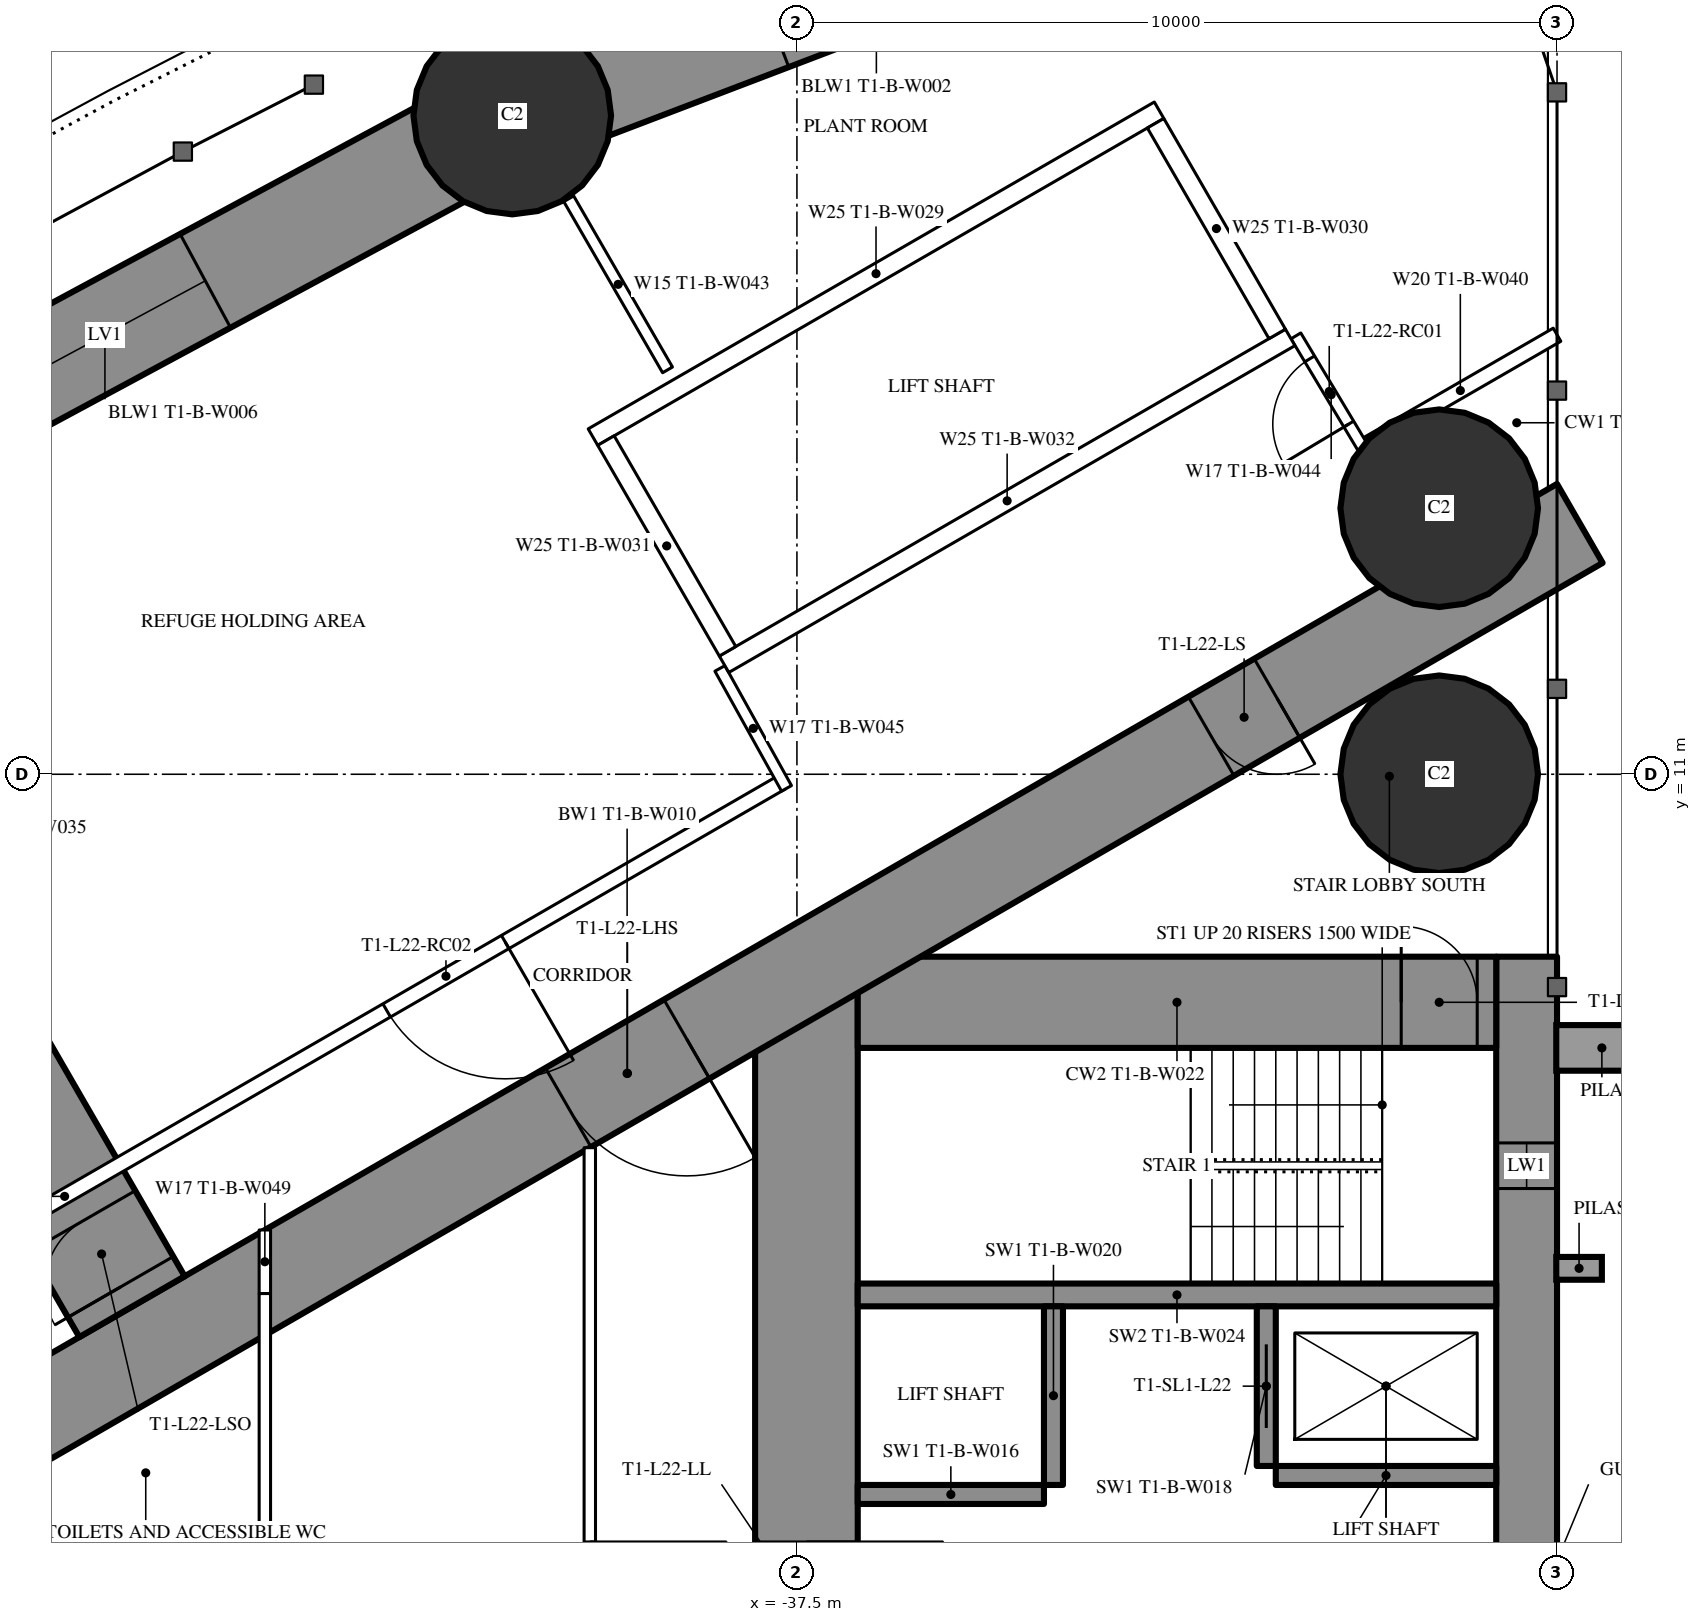
"""IFC4 building model, lengths in metres.
Left out: names, types, materials, properties, quantities, classifications, styles, units other than length and angle.
Written with IfcOpenShell. Run it as: python <this file> out.ifc"""

import sys

from ifc_helpers import new_model, si_unit, direction, frame, frame_2d, origin, origin_2d, place, context, subcontext, project, spatial, rectangle, hollow_circle, extrude, element, fill, save


model = new_model("IFC4")
c1 = context("Model", 3, precision=1e-05, world=origin(), true_north=direction((0.0, 1.0)))
c2 = subcontext(c1, "Body", "Model", "MODEL_VIEW")
j1 = project(units=[si_unit("LENGTHUNIT", "METRE"), si_unit("PLANEANGLEUNIT", "RADIAN")], contexts=[c1])
p1 = place(None, origin())
s1 = spatial("IfcSite", under=j1, at=p1, CompositionType="ELEMENT")
p2 = place(p1, origin())
s2 = spatial("IfcBuilding", under=s1, at=p2, CompositionType="ELEMENT")
p3 = place(p2, frame((0.0, 0.0, 87.0)))
s3 = spatial("IfcBuildingStorey", under=s2, at=p3, CompositionType="ELEMENT", Elevation=87.0)
for number, where, z_axis, x_axis in (
    (1, (-29.05, 11.0, 0.0), (0.0, 0.0, 1.0), (1.0, 0.0, 0.0)),
    (2, (-29.05, 14.5, 0.0), (0.0, 0.0, 1.0), (1.0, 0.0, 0.0)),
    (3, (-41.245, 19.666, 0.0), (0.0, 0.0, 1.0), (1.0, 0.0, 0.0)),
):
    element("IfcColumn", number, at=place(p3, frame(where, z_axis=z_axis, x_axis=x_axis)), inside=s3, PredefinedType="COLUMN", context=c2, shape_type="SweptSolid", body=[
        extrude(hollow_circle(Radius=1.3, WallThickness=0.1, at=origin_2d()), origin(), (0.0, 0.0, 1.0), 3.6),
    ])
p4 = place(p3, frame((-27.9, 8.6, 0.0), z_axis=(0.0, 0.0, 1.0), x_axis=(0.0, -1.0, 0.0)))
e4 = element("IfcWall", 4, at=p4, inside=s3, PredefinedType="SHEAR", context=c2, shape_type="SweptSolid", body=[
    extrude(rectangle(XDim=17.2, YDim=0.8, at=frame_2d((8.6, 0.0))), origin(), (0.0, 0.0, 1.0), 3.6),
])
p5 = place(p4, frame((2.45, 0.0, 0.6)))
e5 = element("IfcOpeningElement", 5, at=p5, cuts=e4, PredefinedType="OPENING", context=c2, shape_type="SweptSolid", body=[
    extrude(rectangle(XDim=0.6, YDim=2.1, at=frame_2d((0.3, 1.05))), frame((0.0, 0.41, 0.0), z_axis=(0.0, -1.0, 0.0), x_axis=(1.0, 0.0, 0.0)), (0.0, 0.0, 1.0), 0.82),
])
p6 = place(p4, frame((14.15, 0.0, 0.6)))
e6 = element("IfcOpeningElement", 6, at=p6, cuts=e4, PredefinedType="OPENING", context=c2, shape_type="SweptSolid", body=[
    extrude(rectangle(XDim=0.6, YDim=2.1, at=frame_2d((0.3, 1.05))), frame((0.0, 0.41, 0.0), z_axis=(0.0, -1.0, 0.0), x_axis=(1.0, 0.0, 0.0)), (0.0, 0.0, 1.0), 0.82),
])
p7 = place(p3, frame((-37.375, 8.6, 0.0), z_axis=(0.0, 0.0, 1.0), x_axis=(0.0, -1.0, 0.0)))
e7 = element("IfcWall", 7, at=p7, inside=s3, PredefinedType="SHEAR", context=c2, shape_type="SweptSolid", body=[
    extrude(rectangle(XDim=17.2, YDim=1.35, at=frame_2d((8.6, 0.0))), origin(), (0.0, 0.0, 1.0), 3.6),
])
p8 = place(p7, frame((7.7, 0.0, 0.0)))
e8 = element("IfcOpeningElement", 8, at=p8, cuts=e7, PredefinedType="OPENING", context=c2, shape_type="SweptSolid", body=[
    extrude(rectangle(XDim=1.8, YDim=2.2, at=frame_2d((0.9, 1.1))), frame((0.0, 0.685, 0.0), z_axis=(0.0, -1.0, 0.0), x_axis=(1.0, 0.0, 0.0)), (0.0, 0.0, 1.0), 1.37),
])
p9 = place(p3, frame((-28.3, 8.0, 0.0), z_axis=(0.0, 0.0, 1.0), x_axis=(-1.0, 0.0, 0.0)))
e9 = element("IfcWall", 9, at=p9, inside=s3, PredefinedType="SHEAR", context=c2, shape_type="SweptSolid", body=[
    extrude(rectangle(XDim=8.4, YDim=1.2, at=frame_2d((4.2, 0.0))), origin(), (0.0, 0.0, 1.0), 3.6),
])
p10 = place(p9, frame((0.25, 0.0, 0.0)))
e10 = element("IfcOpeningElement", 10, at=p10, cuts=e9, PredefinedType="OPENING", context=c2, shape_type="SweptSolid", body=[
    extrude(rectangle(XDim=1.0, YDim=2.2, at=frame_2d((0.5, 1.1))), frame((0.0, 0.61, 0.0), z_axis=(0.0, -1.0, 0.0), x_axis=(1.0, 0.0, 0.0)), (0.0, 0.0, 1.0), 1.22),
])
p11 = place(p3, frame((-28.3, 4.15, 0.0), z_axis=(0.0, 0.0, 1.0), x_axis=(-1.0, 0.0, 0.0)))
e11 = element("IfcWall", 11, at=p11, inside=s3, PredefinedType="SHEAR", context=c2, shape_type="SweptSolid", body=[
    extrude(rectangle(XDim=8.4, YDim=0.3, at=frame_2d((4.2, 0.0))), origin(), (0.0, 0.0, 1.0), 3.6),
])
p12 = place(p3, frame((-31.325, 4.0, 0.0), z_axis=(0.0, 0.0, 1.0), x_axis=(0.0, -1.0, 0.0)))
e12 = element("IfcWall", 12, at=p12, inside=s3, PredefinedType="SHEAR", context=c2, shape_type="SweptSolid", body=[
    extrude(rectangle(XDim=2.1, YDim=0.25, at=frame_2d((1.05, 0.0))), origin(), (0.0, 0.0, 1.0), 3.6),
])
p13 = place(p12, frame((0.5, 0.0, 0.0)))
e13 = element("IfcOpeningElement", 13, at=p13, cuts=e12, PredefinedType="OPENING", context=c2, shape_type="SweptSolid", body=[
    extrude(rectangle(XDim=1.1, YDim=2.2, at=frame_2d((0.55, 1.1))), frame((0.0, 0.135, 0.0), z_axis=(0.0, -1.0, 0.0), x_axis=(1.0, 0.0, 0.0)), (0.0, 0.0, 1.0), 0.27),
])
p14 = place(p3, frame((-34.125, 4.0, 0.0), z_axis=(0.0, 0.0, 1.0), x_axis=(0.0, -1.0, 0.0)))
e14 = element("IfcWall", 14, at=p14, inside=s3, PredefinedType="SHEAR", context=c2, shape_type="SweptSolid", body=[
    extrude(rectangle(XDim=2.35, YDim=0.25, at=frame_2d((1.175, 0.0))), origin(), (0.0, 0.0, 1.0), 3.6),
])
p15 = place(p3, frame((-28.3, 1.775, 0.0), z_axis=(0.0, 0.0, 1.0), x_axis=(-1.0, 0.0, 0.0)))
e15 = element("IfcWall", 15, at=p15, inside=s3, PredefinedType="SHEAR", context=c2, shape_type="SweptSolid", body=[
    extrude(rectangle(XDim=2.9, YDim=0.25, at=frame_2d((1.45, 0.0))), origin(), (0.0, 0.0, 1.0), 3.6),
])
p16 = place(p3, frame((-34.25, 1.525, 0.0), z_axis=(0.0, 0.0, 1.0), x_axis=(-1.0, 0.0, 0.0)))
e16 = element("IfcWall", 16, at=p16, inside=s3, PredefinedType="SHEAR", context=c2, shape_type="SweptSolid", body=[
    extrude(rectangle(XDim=2.45, YDim=0.25, at=frame_2d((1.225, 0.0))), origin(), (0.0, 0.0, 1.0), 3.6),
])
p17 = place(p3, frame((-27.2, 14.3, 0.0), z_axis=(0.0, 0.0, 1.0), x_axis=(-0.866026593062, -0.499997940104, 0.0)))
e17 = element("IfcWall", 17, at=p17, inside=s3, PredefinedType="SHEAR", context=c2, shape_type="SweptSolid", body=[
    extrude(rectangle(XDim=28.946, YDim=1.2, at=frame_2d((14.473, 0.0))), origin(), (0.0, 0.0, 1.0), 3.6),
])
p18 = place(p17, frame((4.6, 0.0, 0.0)))
e18 = element("IfcOpeningElement", 18, at=p18, cuts=e17, PredefinedType="OPENING", context=c2, shape_type="SweptSolid", body=[
    extrude(rectangle(XDim=1.0, YDim=2.2, at=frame_2d((0.5, 1.1))), frame((0.0, 0.61, 0.0), z_axis=(0.0, -1.0, 0.0), x_axis=(1.0, 0.0, 0.0)), (0.0, 0.0, 1.0), 1.22),
])
p19 = place(p17, frame((13.568, 0.0, 0.0)))
e19 = element("IfcOpeningElement", 19, at=p19, cuts=e17, PredefinedType="OPENING", context=c2, shape_type="SweptSolid", body=[
    extrude(rectangle(XDim=1.8, YDim=2.03, at=frame_2d((0.9, 1.015))), frame((0.0, 0.61, 0.0), z_axis=(0.0, -1.0, 0.0), x_axis=(1.0, 0.0, 0.0)), (0.0, 0.0, 1.0), 1.22),
])
p20 = place(p3, frame((-46.248, 3.996, 0.0), z_axis=(0.0, 0.0, 1.0), x_axis=(-0.499993613132, 0.866029091213, 0.0)))
e20 = element("IfcWall", 20, at=p20, inside=s3, PredefinedType="SHEAR", context=c2, shape_type="SweptSolid", body=[
    extrude(rectangle(XDim=11.431, YDim=1.6, at=frame_2d((5.715, 0.0))), origin(), (0.0, 0.0, 1.0), 3.6),
])
p21 = place(p20, frame((0.3, 0.0, 0.0)))
e21 = element("IfcOpeningElement", 21, at=p21, cuts=e20, PredefinedType="OPENING", context=c2, shape_type="SweptSolid", body=[
    extrude(rectangle(XDim=1.0, YDim=2.2, at=frame_2d((0.5, 1.1))), frame((0.0, 0.81, 0.0), z_axis=(0.0, -1.0, 0.0), x_axis=(1.0, 0.0, 0.0)), (0.0, 0.0, 1.0), 1.62),
])
p22 = place(p3, frame((-31.665, 23.318, 0.0), z_axis=(0.0, 0.0, 1.0), x_axis=(-0.934392266213, -0.356245832033, 0.0)))
e22 = element("IfcWall", 22, at=p22, inside=s3, PredefinedType="SHEAR", context=c2, shape_type="SweptSolid", body=[
    extrude(rectangle(XDim=10.253, YDim=1.4, at=frame_2d((5.126, 0.0))), origin(), (0.0, 0.0, 1.0), 3.6),
])
p23 = place(p22, frame((3.626, 0.0, 0.6)))
e23 = element("IfcOpeningElement", 23, at=p23, cuts=e22, PredefinedType="OPENING", context=c2, shape_type="SweptSolid", body=[
    extrude(rectangle(XDim=3.0, YDim=1.2, at=frame_2d((1.5, 0.6))), frame((0.0, 0.71, 0.0), z_axis=(0.0, -1.0, 0.0), x_axis=(1.0, 0.0, 0.0)), (0.0, 0.0, 1.0), 1.42),
])
p24 = place(p3, frame((-41.245, 19.666, 0.0), z_axis=(0.0, 0.0, 1.0), x_axis=(-0.880492350889, -0.474060354835, 0.0)))
e24 = element("IfcWall", 24, at=p24, inside=s3, PredefinedType="SHEAR", context=c2, shape_type="SweptSolid", body=[
    extrude(rectangle(XDim=12.173, YDim=1.4, at=frame_2d((6.086, 0.0))), origin(), (0.0, 0.0, 1.0), 3.6),
])
p25 = place(p24, frame((4.586, 0.0, 0.6)))
e25 = element("IfcOpeningElement", 25, at=p25, cuts=e24, PredefinedType="OPENING", context=c2, shape_type="SweptSolid", body=[
    extrude(rectangle(XDim=3.0, YDim=1.2, at=frame_2d((1.5, 0.6))), frame((0.0, 0.71, 0.0), z_axis=(0.0, -1.0, 0.0), x_axis=(1.0, 0.0, 0.0)), (0.0, 0.0, 1.0), 1.42),
])
p26 = place(p3, frame((-39.202, 16.32, 0.0), z_axis=(0.0, 0.0, 1.0), x_axis=(-0.499947391036, 0.866055775454, 0.0)))
e26 = element("IfcWall", 26, at=p26, inside=s3, PredefinedType="PARTITIONING", context=c2, shape_type="SweptSolid", body=[
    extrude(rectangle(XDim=2.599, YDim=0.15, at=frame_2d((1.3, 0.0))), origin(), (0.0, 0.0, 1.0), 3.35),
])
p27 = place(p3, frame((-27.5, 16.782, 0.0), z_axis=(0.0, 0.0, 1.0), x_axis=(-0.866045812642, -0.499964649156, 0.0)))
e27 = element("IfcWall", 27, at=p27, inside=s3, PredefinedType="PARTITIONING", context=c2, shape_type="SweptSolid", body=[
    extrude(rectangle(XDim=2.938, YDim=0.2, at=frame_2d((1.469, 0.0))), origin(), (0.0, 0.0, 1.0), 3.35),
])
p28 = place(p3, frame((-37.7, 10.894, 0.0), z_axis=(0.0, 0.0, 1.0), x_axis=(-0.866027905338, -0.499995667157, 0.0)))
e28 = element("IfcWall", 28, at=p28, inside=s3, PredefinedType="PARTITIONING", context=c2, shape_type="SweptSolid", body=[
    extrude(rectangle(XDim=21.787, YDim=0.2, at=frame_2d((10.894, 0.0))), origin(), (0.0, 0.0, 1.0), 3.35),
])
p29 = place(p28, frame((15.094, 0.0, 0.0)))
e29 = element("IfcOpeningElement", 29, at=p29, cuts=e28, PredefinedType="OPENING", context=c2, shape_type="SweptSolid", body=[
    extrude(rectangle(XDim=1.8, YDim=2.2, at=frame_2d((0.9, 1.1))), frame((0.0, 0.11, 0.0), z_axis=(0.0, -1.0, 0.0), x_axis=(1.0, 0.0, 0.0)), (0.0, 0.0, 1.0), 0.22),
])
p30 = place(p28, frame((4.201, 0.0, 0.0)))
e30 = element("IfcOpeningElement", 30, at=p30, cuts=e28, PredefinedType="OPENING", context=c2, shape_type="SweptSolid", body=[
    extrude(rectangle(XDim=1.8, YDim=2.2, at=frame_2d((0.9, 1.1))), frame((0.0, 0.11, 0.0), z_axis=(0.0, -1.0, 0.0), x_axis=(1.0, 0.0, 0.0)), (0.0, 0.0, 1.0), 0.22),
])
p31 = place(p3, frame((-30.007, 15.219, 0.0), z_axis=(0.0, 0.0, 1.0), x_axis=(-0.514296815006, 0.857612258585, 0.0)))
e31 = element("IfcWall", 31, at=p31, inside=s3, PredefinedType="PARTITIONING", context=c2, shape_type="SweptSolid", body=[
    extrude(rectangle(XDim=1.805, YDim=0.15, at=frame_2d((0.902, 0.0))), origin(), (0.0, 0.0, 1.0), 2.3),
])
p32 = place(p31, frame((0.452, 0.0, 0.0)))
e32 = element("IfcOpeningElement", 32, at=p32, cuts=e31, PredefinedType="OPENING", context=c2, shape_type="SweptSolid", body=[
    extrude(rectangle(XDim=1.0, YDim=2.03, at=frame_2d((0.5, 1.015))), frame((0.0, 0.085, 0.0), z_axis=(0.0, -1.0, 0.0), x_axis=(1.0, 0.0, 0.0)), (0.0, 0.0, 1.0), 0.17),
])
p33 = place(p3, frame((-38.513, 12.392, 0.0), z_axis=(0.0, 0.0, 1.0), x_axis=(0.485585508183, -0.874189175317, 0.0)))
e33 = element("IfcWall", 33, at=p33, inside=s3, PredefinedType="PARTITIONING", context=c2, shape_type="SweptSolid", body=[
    extrude(rectangle(XDim=1.805, YDim=0.15, at=frame_2d((0.902, 0.0))), origin(), (0.0, 0.0, 1.0), 3.35),
])
p34 = place(p3, frame((-40.225, 6.087, 0.0), z_axis=(0.0, 0.0, 1.0), x_axis=(0.0, -1.0, 0.0)))
e34 = element("IfcWall", 34, at=p34, inside=s3, PredefinedType="PARTITIONING", context=c2, shape_type="SweptSolid", body=[
    extrude(rectangle(XDim=12.174, YDim=0.15, at=frame_2d((6.087, 0.0))), origin(), (0.0, 0.0, 1.0), 3.35),
])
p35 = place(p34, frame((5.187, 0.0, 0.0)))
e35 = element("IfcOpeningElement", 35, at=p35, cuts=e34, PredefinedType="OPENING", context=c2, shape_type="SweptSolid", body=[
    extrude(rectangle(XDim=1.8, YDim=2.2, at=frame_2d((0.9, 1.1))), frame((0.0, 0.085, 0.0), z_axis=(0.0, -1.0, 0.0), x_axis=(1.0, 0.0, 0.0)), (0.0, 0.0, 1.0), 0.17),
])
p36 = place(p3, frame((-44.5, 4.169, 0.0), z_axis=(0.0, 0.0, 1.0), x_axis=(0.0, -1.0, 0.0)))
e36 = element("IfcWall", 36, at=p36, inside=s3, PredefinedType="PARTITIONING", context=c2, shape_type="SweptSolid", body=[
    extrude(rectangle(XDim=9.173, YDim=0.15, at=frame_2d((4.587, 0.0))), origin(), (0.0, 0.0, 1.0), 3.35),
])
p37 = place(p36, frame((3.669, 0.0, 0.0)))
e37 = element("IfcOpeningElement", 37, at=p37, cuts=e36, PredefinedType="OPENING", context=c2, shape_type="SweptSolid", body=[
    extrude(rectangle(XDim=1.0, YDim=2.2, at=frame_2d((0.5, 1.1))), frame((0.0, 0.085, 0.0), z_axis=(0.0, -1.0, 0.0), x_axis=(1.0, 0.0, 0.0)), (0.0, 0.0, 1.0), 0.17),
])
for number, where, z_axis, x_axis in (
    (38, (-31.01, 16.747, 0.0), (0.0, 0.0, 1.0), (-0.866, -0.5, 0.0)),
    (39, (-32.736, 19.736, 0.0), (0.0, 0.0, 1.0), (-0.866, -0.5, 0.0)),
):
    element("IfcWall", number, at=place(p3, frame(where, z_axis=z_axis, x_axis=x_axis)), inside=s3, PredefinedType="PARTITIONING", context=c2, shape_type="SweptSolid", body=[
        extrude(rectangle(XDim=8.6, YDim=0.25, at=frame_2d((4.3, 0.0))), origin(), (0.0, 0.0, 1.0), 3.35),
    ])
p38 = place(p3, frame((-31.181, 16.793, 0.0), z_axis=(0.0, 0.0, 1.0), x_axis=(-0.499929347863, 0.866066190972, 0.0)))
e40 = element("IfcWall", 40, at=p38, inside=s3, PredefinedType="PARTITIONING", context=c2, shape_type="SweptSolid", body=[
    extrude(rectangle(XDim=3.201, YDim=0.25, at=frame_2d((1.6, 0.0))), origin(), (0.0, 0.0, 1.0), 3.35),
])
p39 = place(p3, frame((-38.413, 12.618, 0.0), z_axis=(0.0, 0.0, 1.0), x_axis=(-0.499872130319, 0.866099216793, 0.0)))
e41 = element("IfcWall", 41, at=p39, inside=s3, PredefinedType="PARTITIONING", context=c2, shape_type="SweptSolid", body=[
    extrude(rectangle(XDim=3.2, YDim=0.25, at=frame_2d((1.6, 0.0))), origin(), (0.0, 0.0, 1.0), 3.35),
])
p40 = place(p3, frame((-44.5, 5.005, 0.0), z_axis=(0.0, 0.0, 1.0), x_axis=(0.0, -1.0, 0.0)))
e42 = element("IfcWall", 42, at=p40, inside=s3, PredefinedType="PARTITIONING", context=c2, shape_type="SweptSolid", body=[
    extrude(rectangle(XDim=0.836, YDim=0.15, at=frame_2d((0.418, 0.0))), origin(), (0.0, 0.0, 1.0), 2.05),
])
p41 = place(p25, origin())
e43 = element("IfcWindow", 43, at=p41, inside=s3, PartitioningType="SINGLE_PANEL", PredefinedType="WINDOW", context=c2, shape_type="SweptSolid", body=[
    extrude(rectangle(XDim=3.0, YDim=1.2, at=frame_2d((1.5, 0.6))), frame((0.0, 0.03, 0.0), z_axis=(0.0, -1.0, 0.0), x_axis=(1.0, 0.0, 0.0)), (0.0, 0.0, 1.0), 0.06),
])
fill(e25, e43)
p42 = place(p21, origin())
e44 = element("IfcDoor", 44, at=p42, inside=s3, OperationType="SINGLE_SWING_LEFT", PredefinedType="DOOR", context=c2, shape_type="SweptSolid", body=[
    extrude(rectangle(XDim=1.0, YDim=2.2, at=frame_2d((0.5, 1.1))), frame((0.0, 0.025, 0.0), z_axis=(0.0, -1.0, 0.0), x_axis=(1.0, 0.0, 0.0)), (0.0, 0.0, 1.0), 0.05),
])
fill(e21, e44)
p43 = place(p32, origin())
e45 = element("IfcDoor", 45, at=p43, inside=s3, OperationType="SINGLE_SWING_LEFT", PredefinedType="DOOR", context=c2, shape_type="SweptSolid", body=[
    extrude(rectangle(XDim=1.0, YDim=2.03, at=frame_2d((0.5, 1.015))), frame((0.0, 0.025, 0.0), z_axis=(0.0, -1.0, 0.0), x_axis=(1.0, 0.0, 0.0)), (0.0, 0.0, 1.0), 0.05),
])
fill(e32, e45)
p44 = place(p30, origin())
e46 = element("IfcDoor", 46, at=p44, inside=s3, OperationType="DOUBLE_DOOR_SINGLE_SWING", PredefinedType="DOOR", context=c2, shape_type="SweptSolid", body=[
    extrude(rectangle(XDim=1.8, YDim=2.2, at=frame_2d((0.9, 1.1))), frame((0.0, 0.025, 0.0), z_axis=(0.0, -1.0, 0.0), x_axis=(1.0, 0.0, 0.0)), (0.0, 0.0, 1.0), 0.05),
])
fill(e30, e46)
p45 = place(p35, origin())
e47 = element("IfcDoor", 47, at=p45, inside=s3, OperationType="DOUBLE_DOOR_SINGLE_SWING", PredefinedType="DOOR", context=c2, shape_type="SweptSolid", body=[
    extrude(rectangle(XDim=1.8, YDim=2.2, at=frame_2d((0.9, 1.1))), frame((0.0, 0.025, 0.0), z_axis=(0.0, -1.0, 0.0), x_axis=(1.0, 0.0, 0.0)), (0.0, 0.0, 1.0), 0.05),
])
fill(e35, e47)
p46 = place(p18, origin())
e48 = element("IfcDoor", 48, at=p46, inside=s3, OperationType="SINGLE_SWING_LEFT", PredefinedType="DOOR", context=c2, shape_type="SweptSolid", body=[
    extrude(rectangle(XDim=1.0, YDim=2.2, at=frame_2d((0.5, 1.1))), frame((0.0, 0.025, 0.0), z_axis=(0.0, -1.0, 0.0), x_axis=(1.0, 0.0, 0.0)), (0.0, 0.0, 1.0), 0.05),
])
fill(e18, e48)
p47 = place(p19, origin())
e49 = element("IfcDoor", 49, at=p47, inside=s3, OperationType="DOUBLE_DOOR_SINGLE_SWING", PredefinedType="DOOR", context=c2, shape_type="SweptSolid", body=[
    extrude(rectangle(XDim=1.8, YDim=2.03, at=frame_2d((0.9, 1.015))), frame((0.0, 0.025, 0.0), z_axis=(0.0, -1.0, 0.0), x_axis=(1.0, 0.0, 0.0)), (0.0, 0.0, 1.0), 0.05),
])
fill(e19, e49)
p48 = place(p8, origin())
e50 = element("IfcDoor", 50, at=p48, inside=s3, OperationType="DOUBLE_DOOR_SINGLE_SWING", PredefinedType="DOOR", context=c2, shape_type="SweptSolid", body=[
    extrude(rectangle(XDim=1.8, YDim=2.2, at=frame_2d((0.9, 1.1))), frame((0.0, 0.025, 0.0), z_axis=(0.0, -1.0, 0.0), x_axis=(1.0, 0.0, 0.0)), (0.0, 0.0, 1.0), 0.05),
])
fill(e8, e50)
p49 = place(p10, origin())
e51 = element("IfcDoor", 51, at=p49, inside=s3, OperationType="SINGLE_SWING_RIGHT", PredefinedType="DOOR", context=c2, shape_type="SweptSolid", body=[
    extrude(rectangle(XDim=1.0, YDim=2.2, at=frame_2d((0.5, 1.1))), frame((0.0, 0.025, 0.0), z_axis=(0.0, -1.0, 0.0), x_axis=(1.0, 0.0, 0.0)), (0.0, 0.0, 1.0), 0.05),
])
fill(e10, e51)
p50 = place(p13, origin())
e52 = element("IfcDoor", 52, at=p50, inside=s3, OperationType="SLIDING_TO_LEFT", PredefinedType="USERDEFINED", context=c2, shape_type="SweptSolid", body=[
    extrude(rectangle(XDim=1.1, YDim=2.2, at=frame_2d((0.55, 1.1))), frame((0.0, 0.025, 0.0), z_axis=(0.0, -1.0, 0.0), x_axis=(1.0, 0.0, 0.0)), (0.0, 0.0, 1.0), 0.05),
])
fill(e13, e52)
p51 = place(p5, origin())
e53 = element("IfcWindow", 53, at=p51, inside=s3, PartitioningType="SINGLE_PANEL", PredefinedType="WINDOW", context=c2, shape_type="SweptSolid", body=[
    extrude(rectangle(XDim=0.6, YDim=2.1, at=frame_2d((0.3, 1.05))), frame((0.0, 0.03, 0.0), z_axis=(0.0, -1.0, 0.0), x_axis=(1.0, 0.0, 0.0)), (0.0, 0.0, 1.0), 0.06),
])
fill(e5, e53)
save(model, sys.argv[1])
